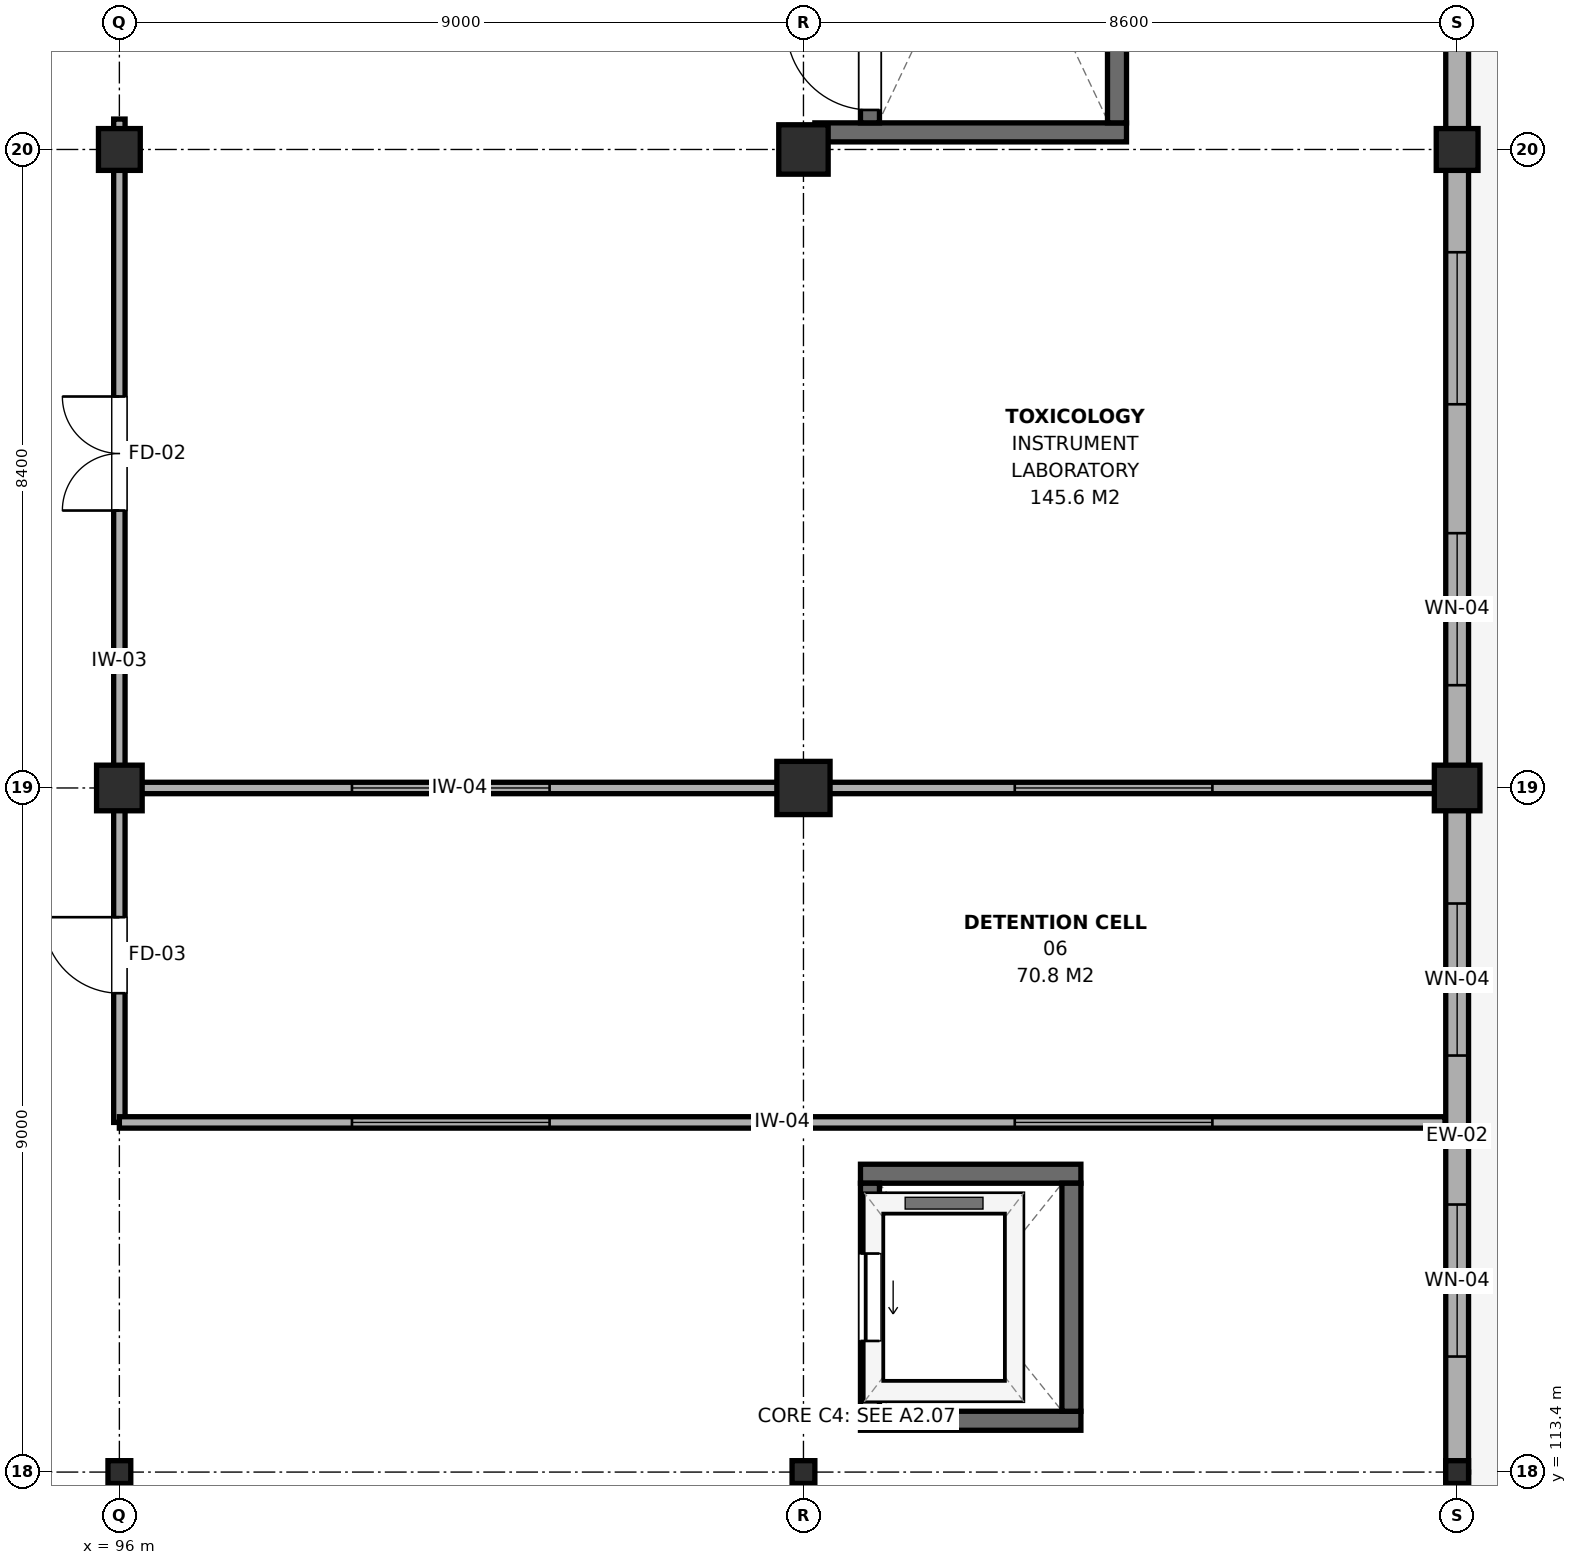
"""IFC4 building model, lengths in metres.
Left out: names, types, materials, properties, quantities, classifications, styles, units other than length and angle.
Written with IfcOpenShell. Run it as: python <this file> out.ifc"""

import sys

from ifc_helpers import new_model, si_unit, direction, frame, frame_2d, origin, origin_2d, place, context, subcontext, project, spatial, rectangle, i_section, extrude, element, fill, save


model = new_model("IFC4")
c1 = context("Model", 3, precision=1e-05, world=origin(), true_north=direction((0.0, 1.0)))
c2 = subcontext(c1, "Body", "Model", "MODEL_VIEW")
j1 = project(units=[si_unit("LENGTHUNIT", "METRE"), si_unit("PLANEANGLEUNIT", "RADIAN")], contexts=[c1])
p1 = place(None, origin())
s1 = spatial("IfcSite", under=j1, at=p1, CompositionType="ELEMENT")
p2 = place(p1, origin())
s2 = spatial("IfcBuilding", under=s1, at=p2, CompositionType="ELEMENT")
p3 = place(p2, frame((0.0, 0.0, 4.8)))
s3 = spatial("IfcBuildingStorey", under=s2, at=p3, CompositionType="ELEMENT", Elevation=4.8)
p4 = place(p3, frame((96.0, 113.4, 0.0), z_axis=(0.0, 0.0, 1.0), x_axis=(1.0, 0.0, 0.0)))
e1 = element("IfcColumn", 1, at=p4, inside=s3, PredefinedType="COLUMN", context=c2, shape_type="SweptSolid", body=[
    extrude(i_section(OverallWidth=0.3, OverallDepth=0.3, WebThickness=0.011, FlangeThickness=0.019, FilletRadius=0.027, at=origin_2d()), origin(), (0.0, 0.0, 1.0), 4.2),
])
p5 = place(p3, frame((96.0, 122.4, 0.0), z_axis=(0.0, 0.0, 1.0), x_axis=(1.0, 0.0, 0.0)))
e2 = element("IfcColumn", 2, at=p5, inside=s3, PredefinedType="COLUMN", context=c2, shape_type="SweptSolid", body=[
    extrude(rectangle(XDim=0.6, YDim=0.6, at=origin_2d()), origin(), (0.0, 0.0, 1.0), 4.2),
])
p6 = place(p3, frame((96.0, 130.8, 0.0), z_axis=(0.0, 0.0, 1.0), x_axis=(1.0, 0.0, 0.0)))
e3 = element("IfcColumn", 3, at=p6, inside=s3, PredefinedType="COLUMN", context=c2, shape_type="SweptSolid", body=[
    extrude(rectangle(XDim=0.55, YDim=0.55, at=origin_2d()), origin(), (0.0, 0.0, 1.0), 4.2),
])
p7 = place(p3, frame((105.0, 113.4, 0.0), z_axis=(0.0, 0.0, 1.0), x_axis=(1.0, 0.0, 0.0)))
e4 = element("IfcColumn", 4, at=p7, inside=s3, PredefinedType="COLUMN", context=c2, shape_type="SweptSolid", body=[
    extrude(i_section(OverallWidth=0.3, OverallDepth=0.3, WebThickness=0.011, FlangeThickness=0.019, FilletRadius=0.027, at=origin_2d()), origin(), (0.0, 0.0, 1.0), 4.2),
])
p8 = place(p3, frame((105.0, 122.4, 0.0), z_axis=(0.0, 0.0, 1.0), x_axis=(1.0, 0.0, 0.0)))
e5 = element("IfcColumn", 5, at=p8, inside=s3, PredefinedType="COLUMN", context=c2, shape_type="SweptSolid", body=[
    extrude(rectangle(XDim=0.7, YDim=0.7, at=origin_2d()), origin(), (0.0, 0.0, 1.0), 4.2),
])
p9 = place(p3, frame((105.0, 130.8, 0.0), z_axis=(0.0, 0.0, 1.0), x_axis=(1.0, 0.0, 0.0)))
e6 = element("IfcColumn", 6, at=p9, inside=s3, PredefinedType="COLUMN", context=c2, shape_type="SweptSolid", body=[
    extrude(rectangle(XDim=0.65, YDim=0.65, at=origin_2d()), origin(), (0.0, 0.0, 1.0), 4.2),
])
p10 = place(p3, frame((113.6, 113.4, 0.0), z_axis=(0.0, 0.0, 1.0), x_axis=(1.0, 0.0, 0.0)))
e7 = element("IfcColumn", 7, at=p10, inside=s3, PredefinedType="COLUMN", context=c2, shape_type="SweptSolid", body=[
    extrude(i_section(OverallWidth=0.3, OverallDepth=0.3, WebThickness=0.011, FlangeThickness=0.019, FilletRadius=0.027, at=origin_2d()), origin(), (0.0, 0.0, 1.0), 4.2),
])
p11 = place(p3, frame((113.6, 122.4, 0.0), z_axis=(0.0, 0.0, 1.0), x_axis=(1.0, 0.0, 0.0)))
e8 = element("IfcColumn", 8, at=p11, inside=s3, PredefinedType="COLUMN", context=c2, shape_type="SweptSolid", body=[
    extrude(rectangle(XDim=0.6, YDim=0.6, at=origin_2d()), origin(), (0.0, 0.0, 1.0), 4.2),
])
p12 = place(p3, frame((113.6, 130.8, 0.0), z_axis=(0.0, 0.0, 1.0), x_axis=(1.0, 0.0, 0.0)))
e9 = element("IfcColumn", 9, at=p12, inside=s3, PredefinedType="COLUMN", context=c2, shape_type="SweptSolid", body=[
    extrude(rectangle(XDim=0.55, YDim=0.55, at=origin_2d()), origin(), (0.0, 0.0, 1.0), 4.2),
])
p13 = place(p3, frame((105.15, 131.025, 0.0), z_axis=(0.0, 0.0, 1.0), x_axis=(1.0, 0.0, 0.0)))
e10 = element("IfcWall", 10, at=p13, inside=s3, PredefinedType="SHEAR", context=c2, shape_type="SweptSolid", body=[
    extrude(rectangle(XDim=4.1, YDim=0.25, at=frame_2d((2.05, 0.0))), origin(), (0.0, 0.0, 1.0), 3.98),
])
p14 = place(p3, frame((105.875, 131.15, 0.0), z_axis=(0.0, 0.0, 1.0), x_axis=(0.0, 1.0, 0.0)))
e11 = element("IfcWall", 11, at=p14, inside=s3, PredefinedType="SHEAR", context=c2, shape_type="SweptSolid", body=[
    extrude(rectangle(XDim=6.4, YDim=0.25, at=frame_2d((3.2, 0.0))), origin(), (0.0, 0.0, 1.0), 3.98),
])
p15 = place(p14, frame((0.17, 0.0, 0.0)))
e12 = element("IfcOpeningElement", 12, at=p15, cuts=e11, PredefinedType="OPENING", context=c2, shape_type="SweptSolid", body=[
    extrude(rectangle(XDim=1.1, YDim=2.15, at=frame_2d((0.55, 1.075))), frame((0.0, 0.14, 0.0), z_axis=(0.0, -1.0, 0.0), x_axis=(1.0, 0.0, 0.0)), (0.0, 0.0, 1.0), 0.28),
])
p16 = place(p3, frame((109.125, 131.15, 0.0), z_axis=(0.0, 0.0, 1.0), x_axis=(0.0, 1.0, 0.0)))
e13 = element("IfcWall", 13, at=p16, inside=s3, PredefinedType="SHEAR", context=c2, shape_type="SweptSolid", body=[
    extrude(rectangle(XDim=6.4, YDim=0.25, at=frame_2d((3.2, 0.0))), origin(), (0.0, 0.0, 1.0), 3.98),
])
for number, where, z_axis, x_axis in (
    (14, (105.75, 114.075, 0.0), (0.0, 0.0, 1.0), (1.0, 0.0, 0.0)),
    (15, (105.75, 117.325, 0.0), (0.0, 0.0, 1.0), (1.0, 0.0, 0.0)),
):
    element("IfcWall", number, at=place(p3, frame(where, z_axis=z_axis, x_axis=x_axis)), inside=s3, PredefinedType="SHEAR", context=c2, shape_type="SweptSolid", body=[
        extrude(rectangle(XDim=2.9, YDim=0.25, at=frame_2d((1.45, 0.0))), origin(), (0.0, 0.0, 1.0), 3.98),
    ])
p17 = place(p3, frame((105.875, 114.2, 0.0), z_axis=(0.0, 0.0, 1.0), x_axis=(0.0, 1.0, 0.0)))
e16 = element("IfcWall", 16, at=p17, inside=s3, PredefinedType="SHEAR", context=c2, shape_type="SweptSolid", body=[
    extrude(rectangle(XDim=3.0, YDim=0.25, at=frame_2d((1.5, 0.0))), origin(), (0.0, 0.0, 1.0), 3.98),
])
p18 = place(p17, frame((0.925, 0.0, 0.0)))
e17 = element("IfcOpeningElement", 17, at=p18, cuts=e16, PredefinedType="OPENING", context=c2, shape_type="SweptSolid", body=[
    extrude(rectangle(XDim=1.15, YDim=2.15, at=frame_2d((0.575, 1.075))), frame((0.0, 0.14, 0.0), z_axis=(0.0, -1.0, 0.0), x_axis=(1.0, 0.0, 0.0)), (0.0, 0.0, 1.0), 0.28),
])
p19 = place(p3, frame((108.525, 114.2, 0.0), z_axis=(0.0, 0.0, 1.0), x_axis=(0.0, 1.0, 0.0)))
e18 = element("IfcWall", 18, at=p19, inside=s3, PredefinedType="SHEAR", context=c2, shape_type="SweptSolid", body=[
    extrude(rectangle(XDim=3.0, YDim=0.25, at=frame_2d((1.5, 0.0))), origin(), (0.0, 0.0, 1.0), 3.98),
])
p20 = place(p3, frame((113.6, 104.4, 0.0), z_axis=(0.0, 0.0, 1.0), x_axis=(0.0, 1.0, 0.0)))
e19 = element("IfcWall", 19, at=p20, inside=s3, PredefinedType="SOLIDWALL", context=c2, shape_type="SweptSolid", body=[
    extrude(rectangle(XDim=9.0, YDim=0.3, at=frame_2d((4.5, 0.0))), origin(), (0.0, 0.0, 1.0), 3.435),
])
p21 = place(p20, frame((1.52, 0.0, 1.1)))
e20 = element("IfcOpeningElement", 20, at=p21, cuts=e19, PredefinedType="OPENING", context=c2, shape_type="SweptSolid", body=[
    extrude(rectangle(XDim=2.0, YDim=1.8, at=frame_2d((1.0, 0.9))), frame((0.0, 0.165, 0.0), z_axis=(0.0, -1.0, 0.0), x_axis=(1.0, 0.0, 0.0)), (0.0, 0.0, 1.0), 0.33),
])
p22 = place(p20, frame((5.48, 0.0, 1.1)))
e21 = element("IfcOpeningElement", 21, at=p22, cuts=e19, PredefinedType="OPENING", context=c2, shape_type="SweptSolid", body=[
    extrude(rectangle(XDim=2.0, YDim=1.8, at=frame_2d((1.0, 0.9))), frame((0.0, 0.165, 0.0), z_axis=(0.0, -1.0, 0.0), x_axis=(1.0, 0.0, 0.0)), (0.0, 0.0, 1.0), 0.33),
])
p23 = place(p3, frame((113.6, 113.4, 0.0), z_axis=(0.0, 0.0, 1.0), x_axis=(0.0, 1.0, 0.0)))
e22 = element("IfcWall", 22, at=p23, inside=s3, PredefinedType="SOLIDWALL", context=c2, shape_type="SweptSolid", body=[
    extrude(rectangle(XDim=9.0, YDim=0.3, at=frame_2d((4.5, 0.0))), origin(), (0.0, 0.0, 1.0), 3.485),
])
p24 = place(p23, frame((1.52, 0.0, 1.1)))
e23 = element("IfcOpeningElement", 23, at=p24, cuts=e22, PredefinedType="OPENING", context=c2, shape_type="SweptSolid", body=[
    extrude(rectangle(XDim=2.0, YDim=1.8, at=frame_2d((1.0, 0.9))), frame((0.0, 0.165, 0.0), z_axis=(0.0, -1.0, 0.0), x_axis=(1.0, 0.0, 0.0)), (0.0, 0.0, 1.0), 0.33),
])
p25 = place(p23, frame((5.48, 0.0, 1.1)))
e24 = element("IfcOpeningElement", 24, at=p25, cuts=e22, PredefinedType="OPENING", context=c2, shape_type="SweptSolid", body=[
    extrude(rectangle(XDim=2.0, YDim=1.8, at=frame_2d((1.0, 0.9))), frame((0.0, 0.165, 0.0), z_axis=(0.0, -1.0, 0.0), x_axis=(1.0, 0.0, 0.0)), (0.0, 0.0, 1.0), 0.33),
])
p26 = place(p3, frame((113.6, 122.4, 0.0), z_axis=(0.0, 0.0, 1.0), x_axis=(0.0, 1.0, 0.0)))
e25 = element("IfcWall", 25, at=p26, inside=s3, PredefinedType="SOLIDWALL", context=c2, shape_type="SweptSolid", body=[
    extrude(rectangle(XDim=8.4, YDim=0.3, at=frame_2d((4.2, 0.0))), origin(), (0.0, 0.0, 1.0), 3.535),
])
p27 = place(p26, frame((1.352, 0.0, 1.1)))
e26 = element("IfcOpeningElement", 26, at=p27, cuts=e25, PredefinedType="OPENING", context=c2, shape_type="SweptSolid", body=[
    extrude(rectangle(XDim=2.0, YDim=1.8, at=frame_2d((1.0, 0.9))), frame((0.0, 0.165, 0.0), z_axis=(0.0, -1.0, 0.0), x_axis=(1.0, 0.0, 0.0)), (0.0, 0.0, 1.0), 0.33),
])
p28 = place(p26, frame((5.048, 0.0, 1.1)))
e27 = element("IfcOpeningElement", 27, at=p28, cuts=e25, PredefinedType="OPENING", context=c2, shape_type="SweptSolid", body=[
    extrude(rectangle(XDim=2.0, YDim=1.8, at=frame_2d((1.0, 0.9))), frame((0.0, 0.165, 0.0), z_axis=(0.0, -1.0, 0.0), x_axis=(1.0, 0.0, 0.0)), (0.0, 0.0, 1.0), 0.33),
])
p29 = place(p3, frame((113.6, 130.8, 0.0), z_axis=(0.0, 0.0, 1.0), x_axis=(0.0, 1.0, 0.0)))
e28 = element("IfcWall", 28, at=p29, inside=s3, PredefinedType="SOLIDWALL", context=c2, shape_type="SweptSolid", body=[
    extrude(rectangle(XDim=7.2, YDim=0.3, at=frame_2d((3.6, 0.0))), origin(), (0.0, 0.0, 1.0), 3.525),
])
p30 = place(p29, frame((2.7, 0.0, 1.1)))
e29 = element("IfcOpeningElement", 29, at=p30, cuts=e28, PredefinedType="OPENING", context=c2, shape_type="SweptSolid", body=[
    extrude(rectangle(XDim=1.8, YDim=1.2, at=frame_2d((0.9, 0.6))), frame((0.0, 0.165, 0.0), z_axis=(0.0, -1.0, 0.0), x_axis=(1.0, 0.0, 0.0)), (0.0, 0.0, 1.0), 0.33),
])
p31 = place(p3, frame((96.0, 118.0, 0.0), z_axis=(0.0, 0.0, 1.0), x_axis=(0.0, 1.0, 0.0)))
e30 = element("IfcWall", 30, at=p31, inside=s3, PredefinedType="PARTITIONING", context=c2, shape_type="SweptSolid", body=[
    extrude(rectangle(XDim=4.4, YDim=0.15, at=frame_2d((2.2, 0.0))), origin(), (0.0, 0.0, 1.0), 3.535),
])
p32 = place(p31, frame((1.7, 0.0, 0.0)))
e31 = element("IfcOpeningElement", 31, at=p32, cuts=e30, PredefinedType="OPENING", context=c2, shape_type="SweptSolid", body=[
    extrude(rectangle(XDim=1.0, YDim=2.15, at=frame_2d((0.5, 1.075))), frame((0.0, 0.09, 0.0), z_axis=(0.0, -1.0, 0.0), x_axis=(1.0, 0.0, 0.0)), (0.0, 0.0, 1.0), 0.18),
])
p33 = place(p3, frame((96.0, 118.0, 0.0), z_axis=(0.0, 0.0, 1.0), x_axis=(1.0, 0.0, 0.0)))
e32 = element("IfcWall", 32, at=p33, inside=s3, PredefinedType="PARTITIONING", context=c2, shape_type="SweptSolid", body=[
    extrude(rectangle(XDim=17.44, YDim=0.15, at=frame_2d((8.72, 0.0))), origin(), (0.0, 0.0, 1.0), 3.385),
])
p34 = place(p33, frame((3.06, 0.0, 0.95)))
e33 = element("IfcOpeningElement", 33, at=p34, cuts=e32, PredefinedType="OPENING", context=c2, shape_type="SweptSolid", body=[
    extrude(rectangle(XDim=2.6, YDim=1.5, at=frame_2d((1.3, 0.75))), frame((0.0, 0.09, 0.0), z_axis=(0.0, -1.0, 0.0), x_axis=(1.0, 0.0, 0.0)), (0.0, 0.0, 1.0), 0.18),
])
p35 = place(p33, frame((11.78, 0.0, 0.95)))
e34 = element("IfcOpeningElement", 34, at=p35, cuts=e32, PredefinedType="OPENING", context=c2, shape_type="SweptSolid", body=[
    extrude(rectangle(XDim=2.6, YDim=1.5, at=frame_2d((1.3, 0.75))), frame((0.0, 0.09, 0.0), z_axis=(0.0, -1.0, 0.0), x_axis=(1.0, 0.0, 0.0)), (0.0, 0.0, 1.0), 0.18),
])
p36 = place(p3, frame((96.0, 122.4, 0.0), z_axis=(0.0, 0.0, 1.0), x_axis=(0.0, 1.0, 0.0)))
e35 = element("IfcWall", 35, at=p36, inside=s3, PredefinedType="PARTITIONING", context=c2, shape_type="SweptSolid", body=[
    extrude(rectangle(XDim=8.8, YDim=0.15, at=frame_2d((4.4, 0.0))), origin(), (0.0, 0.0, 1.0), 3.525),
])
p37 = place(p36, frame((3.65, 0.0, 0.0)))
e36 = element("IfcOpeningElement", 36, at=p37, cuts=e35, PredefinedType="OPENING", context=c2, shape_type="SweptSolid", body=[
    extrude(rectangle(XDim=1.5, YDim=2.15, at=frame_2d((0.75, 1.075))), frame((0.0, 0.09, 0.0), z_axis=(0.0, -1.0, 0.0), x_axis=(1.0, 0.0, 0.0)), (0.0, 0.0, 1.0), 0.18),
])
p38 = place(p3, frame((96.0, 122.4, 0.0), z_axis=(0.0, 0.0, 1.0), x_axis=(1.0, 0.0, 0.0)))
e37 = element("IfcWall", 37, at=p38, inside=s3, PredefinedType="PARTITIONING", context=c2, shape_type="SweptSolid", body=[
    extrude(rectangle(XDim=17.44, YDim=0.15, at=frame_2d((8.72, 0.0))), origin(), (0.0, 0.0, 1.0), 3.385),
])
p39 = place(p38, frame((3.06, 0.0, 0.95)))
e38 = element("IfcOpeningElement", 38, at=p39, cuts=e37, PredefinedType="OPENING", context=c2, shape_type="SweptSolid", body=[
    extrude(rectangle(XDim=2.6, YDim=1.5, at=frame_2d((1.3, 0.75))), frame((0.0, 0.09, 0.0), z_axis=(0.0, -1.0, 0.0), x_axis=(1.0, 0.0, 0.0)), (0.0, 0.0, 1.0), 0.18),
])
p40 = place(p38, frame((11.78, 0.0, 0.95)))
e39 = element("IfcOpeningElement", 39, at=p40, cuts=e37, PredefinedType="OPENING", context=c2, shape_type="SweptSolid", body=[
    extrude(rectangle(XDim=2.6, YDim=1.5, at=frame_2d((1.3, 0.75))), frame((0.0, 0.09, 0.0), z_axis=(0.0, -1.0, 0.0), x_axis=(1.0, 0.0, 0.0)), (0.0, 0.0, 1.0), 0.18),
])
p41 = place(p24, origin())
e40 = element("IfcWindow", 40, at=p41, inside=s3, PartitioningType="SINGLE_PANEL", PredefinedType="WINDOW", context=c2, shape_type="SweptSolid", body=[
    extrude(rectangle(XDim=2.0, YDim=1.8, at=frame_2d((1.0, 0.9))), frame((0.0, 0.03, 0.0), z_axis=(0.0, -1.0, 0.0), x_axis=(1.0, 0.0, 0.0)), (0.0, 0.0, 1.0), 0.06),
])
fill(e23, e40)
p42 = place(p25, origin())
e41 = element("IfcWindow", 41, at=p42, inside=s3, PartitioningType="SINGLE_PANEL", PredefinedType="WINDOW", context=c2, shape_type="SweptSolid", body=[
    extrude(rectangle(XDim=2.0, YDim=1.8, at=frame_2d((1.0, 0.9))), frame((0.0, 0.03, 0.0), z_axis=(0.0, -1.0, 0.0), x_axis=(1.0, 0.0, 0.0)), (0.0, 0.0, 1.0), 0.06),
])
fill(e24, e41)
p43 = place(p27, origin())
e42 = element("IfcWindow", 42, at=p43, inside=s3, PartitioningType="SINGLE_PANEL", PredefinedType="WINDOW", context=c2, shape_type="SweptSolid", body=[
    extrude(rectangle(XDim=2.0, YDim=1.8, at=frame_2d((1.0, 0.9))), frame((0.0, 0.03, 0.0), z_axis=(0.0, -1.0, 0.0), x_axis=(1.0, 0.0, 0.0)), (0.0, 0.0, 1.0), 0.06),
])
fill(e26, e42)
p44 = place(p28, origin())
e43 = element("IfcWindow", 43, at=p44, inside=s3, PartitioningType="SINGLE_PANEL", PredefinedType="WINDOW", context=c2, shape_type="SweptSolid", body=[
    extrude(rectangle(XDim=2.0, YDim=1.8, at=frame_2d((1.0, 0.9))), frame((0.0, 0.03, 0.0), z_axis=(0.0, -1.0, 0.0), x_axis=(1.0, 0.0, 0.0)), (0.0, 0.0, 1.0), 0.06),
])
fill(e27, e43)
p45 = place(p15, origin())
e44 = element("IfcDoor", 44, at=p45, inside=s3, OperationType="SINGLE_SWING_RIGHT", PredefinedType="DOOR", context=c2, shape_type="SweptSolid", body=[
    extrude(rectangle(XDim=1.1, YDim=2.15, at=frame_2d((0.55, 1.075))), frame((0.0, 0.025, 0.0), z_axis=(0.0, -1.0, 0.0), x_axis=(1.0, 0.0, 0.0)), (0.0, 0.0, 1.0), 0.05),
])
fill(e12, e44)
p46 = place(p18, origin())
e45 = element("IfcDoor", 45, at=p46, inside=s3, OperationType="SLIDING_TO_LEFT", PredefinedType="DOOR", context=c2, shape_type="SweptSolid", body=[
    extrude(rectangle(XDim=1.15, YDim=2.15, at=frame_2d((0.575, 1.075))), frame((0.0, 0.025, 0.0), z_axis=(0.0, -1.0, 0.0), x_axis=(1.0, 0.0, 0.0)), (0.0, 0.0, 1.0), 0.05),
])
fill(e17, e45)
p47 = place(p32, origin())
e46 = element("IfcDoor", 46, at=p47, inside=s3, OperationType="SINGLE_SWING_RIGHT", PredefinedType="DOOR", context=c2, shape_type="SweptSolid", body=[
    extrude(rectangle(XDim=1.0, YDim=2.15, at=frame_2d((0.5, 1.075))), frame((0.0, 0.025, 0.0), z_axis=(0.0, -1.0, 0.0), x_axis=(1.0, 0.0, 0.0)), (0.0, 0.0, 1.0), 0.05),
])
fill(e31, e46)
p48 = place(p34, origin())
e47 = element("IfcWindow", 47, at=p48, inside=s3, PartitioningType="SINGLE_PANEL", PredefinedType="WINDOW", context=c2, shape_type="SweptSolid", body=[
    extrude(rectangle(XDim=2.6, YDim=1.5, at=frame_2d((1.3, 0.75))), frame((0.0, 0.03, 0.0), z_axis=(0.0, -1.0, 0.0), x_axis=(1.0, 0.0, 0.0)), (0.0, 0.0, 1.0), 0.06),
])
fill(e33, e47)
p49 = place(p35, origin())
e48 = element("IfcWindow", 48, at=p49, inside=s3, PartitioningType="SINGLE_PANEL", PredefinedType="WINDOW", context=c2, shape_type="SweptSolid", body=[
    extrude(rectangle(XDim=2.6, YDim=1.5, at=frame_2d((1.3, 0.75))), frame((0.0, 0.03, 0.0), z_axis=(0.0, -1.0, 0.0), x_axis=(1.0, 0.0, 0.0)), (0.0, 0.0, 1.0), 0.06),
])
fill(e34, e48)
p50 = place(p37, origin())
e49 = element("IfcDoor", 49, at=p50, inside=s3, OperationType="DOUBLE_DOOR_SINGLE_SWING", PredefinedType="DOOR", context=c2, shape_type="SweptSolid", body=[
    extrude(rectangle(XDim=1.5, YDim=2.15, at=frame_2d((0.75, 1.075))), frame((0.0, 0.025, 0.0), z_axis=(0.0, -1.0, 0.0), x_axis=(1.0, 0.0, 0.0)), (0.0, 0.0, 1.0), 0.05),
])
fill(e36, e49)
p51 = place(p39, origin())
e50 = element("IfcWindow", 50, at=p51, inside=s3, PartitioningType="SINGLE_PANEL", PredefinedType="WINDOW", context=c2, shape_type="SweptSolid", body=[
    extrude(rectangle(XDim=2.6, YDim=1.5, at=frame_2d((1.3, 0.75))), frame((0.0, 0.03, 0.0), z_axis=(0.0, -1.0, 0.0), x_axis=(1.0, 0.0, 0.0)), (0.0, 0.0, 1.0), 0.06),
])
fill(e38, e50)
p52 = place(p40, origin())
e51 = element("IfcWindow", 51, at=p52, inside=s3, PartitioningType="SINGLE_PANEL", PredefinedType="WINDOW", context=c2, shape_type="SweptSolid", body=[
    extrude(rectangle(XDim=2.6, YDim=1.5, at=frame_2d((1.3, 0.75))), frame((0.0, 0.03, 0.0), z_axis=(0.0, -1.0, 0.0), x_axis=(1.0, 0.0, 0.0)), (0.0, 0.0, 1.0), 0.06),
])
fill(e39, e51)
save(model, sys.argv[1])
